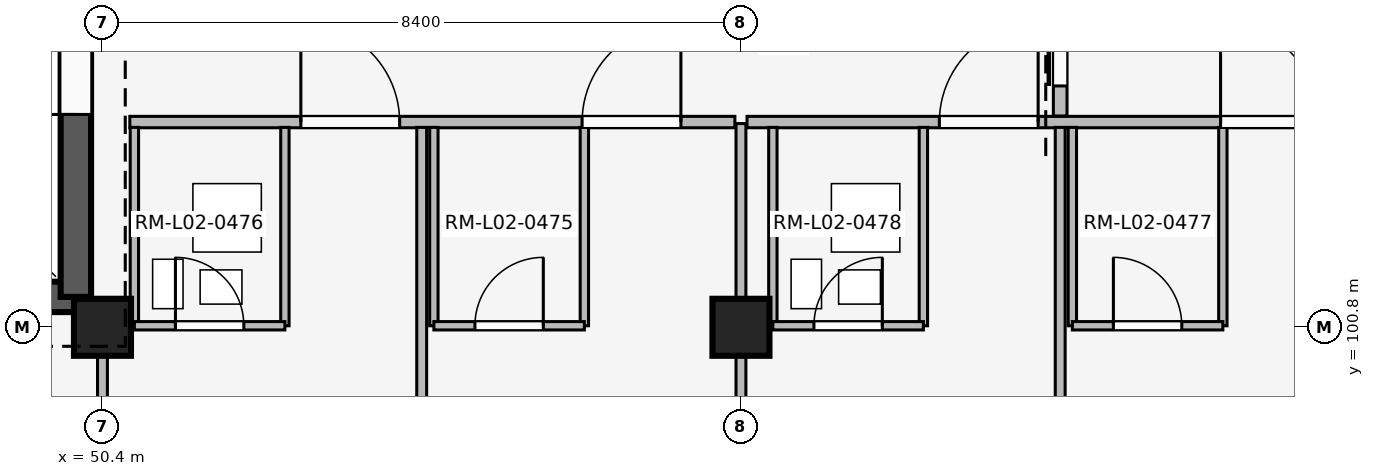
"""IFC4 building model, lengths in metres.
Left out: names, types, materials, properties, quantities, classifications, styles, units other than length and angle.
Written with IfcOpenShell. Run it as: python <this file> out.ifc"""

import sys

from ifc_helpers import new_model, si_unit, direction, frame, frame_2d, origin, origin_2d, place, context, subcontext, project, spatial, rectangle, extrude, element, fill, save


model = new_model("IFC4")
c1 = context("Model", 3, precision=1e-05, world=origin(), true_north=direction((0.0, 1.0)))
c2 = subcontext(c1, "Body", "Model", "MODEL_VIEW")
j1 = project(units=[si_unit("LENGTHUNIT", "METRE"), si_unit("PLANEANGLEUNIT", "RADIAN")], contexts=[c1])
p1 = place(None, origin())
s1 = spatial("IfcSite", under=j1, at=p1, CompositionType="ELEMENT")
p2 = place(p1, origin())
s2 = spatial("IfcBuilding", under=s1, at=p2, CompositionType="ELEMENT")
p3 = place(p2, frame((0.0, 0.0, 8.1)))
s3 = spatial("IfcBuildingStorey", under=s2, at=p3, CompositionType="ELEMENT", Elevation=8.1)
for number, where, z_axis, x_axis in (
    (1, (50.4, 100.8, 0.0), (0.0, 0.0, 1.0), (1.0, 0.0, 0.0)),
    (2, (58.8, 100.8, 0.0), (0.0, 0.0, 1.0), (1.0, 0.0, 0.0)),
):
    element("IfcColumn", number, at=place(p3, frame(where, z_axis=z_axis, x_axis=x_axis)), inside=s3, PredefinedType="COLUMN", context=c2, shape_type="SweptSolid", body=[
        extrude(rectangle(XDim=0.75, YDim=0.75, at=origin_2d()), origin(), (0.0, 0.0, 1.0), 4.8),
    ])
p4 = place(p3, frame((42.55, 101.2, 0.0), z_axis=(0.0, 0.0, 1.0), x_axis=(1.0, 0.0, 0.0)))
e3 = element("IfcWall", 3, at=p4, inside=s3, PredefinedType="SHEAR", context=c2, shape_type="SweptSolid", body=[
    extrude(rectangle(XDim=7.5, YDim=0.4, at=frame_2d((3.75, 0.0))), origin(), (0.0, 0.0, 1.0), 4.52),
])
p5 = place(p4, frame((4.85, 0.0, 0.0)))
e4 = element("IfcOpeningElement", 4, at=p5, cuts=e3, PredefinedType="OPENING", context=c2, shape_type="SweptSolid", body=[
    extrude(rectangle(XDim=1.2, YDim=2.2, at=frame_2d((0.6, 1.1))), frame((0.0, 0.21, 0.0), z_axis=(0.0, -1.0, 0.0), x_axis=(1.0, 0.0, 0.0)), (0.0, 0.0, 1.0), 0.42),
])
p6 = place(p3, frame((50.05, 101.2, 0.0), z_axis=(0.0, 0.0, 1.0), x_axis=(0.0, 1.0, 0.0)))
e5 = element("IfcWall", 5, at=p6, inside=s3, PredefinedType="SHEAR", context=c2, shape_type="SweptSolid", body=[
    extrude(rectangle(XDim=7.55, YDim=0.4, at=frame_2d((3.775, 0.0))), origin(), (0.0, 0.0, 1.0), 4.52),
])
p7 = place(p6, frame((2.4, 0.0, 0.0)))
e6 = element("IfcOpeningElement", 6, at=p7, cuts=e5, PredefinedType="OPENING", context=c2, shape_type="SweptSolid", body=[
    extrude(rectangle(XDim=1.2, YDim=2.2, at=frame_2d((0.6, 1.1))), frame((0.0, 0.21, 0.0), z_axis=(0.0, -1.0, 0.0), x_axis=(1.0, 0.0, 0.0)), (0.0, 0.0, 1.0), 0.42),
])
p8 = place(p3, frame((50.4, 92.54, 0.0), z_axis=(0.0, 0.0, 1.0), x_axis=(0.0, 1.0, 0.0)))
e7 = element("IfcWall", 7, at=p8, inside=s3, PredefinedType="PARTITIONING", context=c2, shape_type="SweptSolid", body=[
    extrude(rectangle(XDim=8.21, YDim=0.13, at=frame_2d((4.105, 0.0))), origin(), (0.0, 0.0, 1.0), 3.84),
])
p9 = place(p8, frame((3.64, 0.0, 0.0)))
e8 = element("IfcOpeningElement", 8, at=p9, cuts=e7, PredefinedType="OPENING", context=c2, shape_type="SweptSolid", body=[
    extrude(rectangle(XDim=1.08, YDim=2.15, at=frame_2d((0.54, 1.075))), frame((0.0, 0.075, 0.0), z_axis=(0.0, -1.0, 0.0), x_axis=(1.0, 0.0, 0.0)), (0.0, 0.0, 1.0), 0.15),
])
p10 = place(p3, frame((50.76, 103.5, 0.0), z_axis=(0.0, 0.0, 1.0), x_axis=(1.0, 0.0, 0.0)))
e9 = element("IfcWall", 9, at=p10, inside=s3, PredefinedType="PARTITIONING", context=c2, shape_type="SweptSolid", body=[
    extrude(rectangle(XDim=7.96, YDim=0.15, at=frame_2d((3.98, 0.0))), origin(), (0.0, 0.0, 1.0), 3.84),
])
p11 = place(p10, frame((2.25, 0.0, 0.0)))
e10 = element("IfcOpeningElement", 10, at=p11, cuts=e9, PredefinedType="OPENING", context=c2, shape_type="SweptSolid", body=[
    extrude(rectangle(XDim=1.3, YDim=2.25, at=frame_2d((0.65, 1.125))), frame((0.0, 0.085, 0.0), z_axis=(0.0, -1.0, 0.0), x_axis=(1.0, 0.0, 0.0)), (0.0, 0.0, 1.0), 0.17),
])
p12 = place(p10, frame((5.95, 0.0, 0.0)))
e11 = element("IfcOpeningElement", 11, at=p12, cuts=e9, PredefinedType="OPENING", context=c2, shape_type="SweptSolid", body=[
    extrude(rectangle(XDim=1.3, YDim=2.25, at=frame_2d((0.65, 1.125))), frame((0.0, 0.085, 0.0), z_axis=(0.0, -1.0, 0.0), x_axis=(1.0, 0.0, 0.0)), (0.0, 0.0, 1.0), 0.17),
])
p13 = place(p3, frame((54.6, 92.5, 0.0), z_axis=(0.0, 0.0, 1.0), x_axis=(0.0, 1.0, 0.0)))
e12 = element("IfcWall", 12, at=p13, inside=s3, PredefinedType="PARTITIONING", context=c2, shape_type="SweptSolid", body=[
    extrude(rectangle(XDim=10.93, YDim=0.13, at=frame_2d((5.465, 0.0))), origin(), (0.0, 0.0, 1.0), 3.84),
])
for number, where, z_axis, x_axis in (
    (13, (50.82, 100.82, 0.0), (0.0, 0.0, 1.0), (0.0, 1.0, 0.0)),
    (14, (52.8, 100.82, 0.0), (0.0, 0.0, 1.0), (0.0, 1.0, 0.0)),
):
    element("IfcWall", number, at=place(p3, frame(where, z_axis=z_axis, x_axis=x_axis)), inside=s3, PredefinedType="PARTITIONING", context=c2, shape_type="SweptSolid", body=[
        extrude(rectangle(XDim=2.61, YDim=0.11, at=frame_2d((1.305, 0.0))), origin(), (0.0, 0.0, 1.0), 3.84),
    ])
p14 = place(p3, frame((50.82, 100.82, 0.0), z_axis=(0.0, 0.0, 1.0), x_axis=(1.0, 0.0, 0.0)))
e15 = element("IfcWall", 15, at=p14, inside=s3, PredefinedType="PARTITIONING", context=c2, shape_type="SweptSolid", body=[
    extrude(rectangle(XDim=1.98, YDim=0.11, at=frame_2d((0.99, 0.0))), origin(), (0.0, 0.0, 1.0), 3.84),
])
p15 = place(p14, frame((0.54, 0.0, 0.0)))
e16 = element("IfcOpeningElement", 16, at=p15, cuts=e15, PredefinedType="OPENING", context=c2, shape_type="SweptSolid", body=[
    extrude(rectangle(XDim=0.9, YDim=2.1, at=frame_2d((0.45, 1.05))), frame((0.0, 0.065, 0.0), z_axis=(0.0, -1.0, 0.0), x_axis=(1.0, 0.0, 0.0)), (0.0, 0.0, 1.0), 0.13),
])
for number, where, z_axis, x_axis in (
    (17, (54.76, 100.82, 0.0), (0.0, 0.0, 1.0), (0.0, 1.0, 0.0)),
    (18, (56.74, 100.82, 0.0), (0.0, 0.0, 1.0), (0.0, 1.0, 0.0)),
):
    element("IfcWall", number, at=place(p3, frame(where, z_axis=z_axis, x_axis=x_axis)), inside=s3, PredefinedType="PARTITIONING", context=c2, shape_type="SweptSolid", body=[
        extrude(rectangle(XDim=2.61, YDim=0.11, at=frame_2d((1.305, 0.0))), origin(), (0.0, 0.0, 1.0), 3.84),
    ])
p16 = place(p3, frame((54.76, 100.82, 0.0), z_axis=(0.0, 0.0, 1.0), x_axis=(1.0, 0.0, 0.0)))
e19 = element("IfcWall", 19, at=p16, inside=s3, PredefinedType="PARTITIONING", context=c2, shape_type="SweptSolid", body=[
    extrude(rectangle(XDim=1.98, YDim=0.11, at=frame_2d((0.99, 0.0))), origin(), (0.0, 0.0, 1.0), 3.84),
])
p17 = place(p16, frame((0.54, 0.0, 0.0)))
e20 = element("IfcOpeningElement", 20, at=p17, cuts=e19, PredefinedType="OPENING", context=c2, shape_type="SweptSolid", body=[
    extrude(rectangle(XDim=0.9, YDim=2.1, at=frame_2d((0.45, 1.05))), frame((0.0, 0.065, 0.0), z_axis=(0.0, -1.0, 0.0), x_axis=(1.0, 0.0, 0.0)), (0.0, 0.0, 1.0), 0.13),
])
p18 = place(p3, frame((58.8, 92.54, 0.0), z_axis=(0.0, 0.0, 1.0), x_axis=(0.0, 1.0, 0.0)))
e21 = element("IfcWall", 21, at=p18, inside=s3, PredefinedType="PARTITIONING", context=c2, shape_type="SweptSolid", body=[
    extrude(rectangle(XDim=10.94, YDim=0.13, at=frame_2d((5.47, 0.0))), origin(), (0.0, 0.0, 1.0), 3.84),
])
p19 = place(p3, frame((58.88, 103.5, 0.0), z_axis=(0.0, 0.0, 1.0), x_axis=(1.0, 0.0, 0.0)))
e22 = element("IfcWall", 22, at=p19, inside=s3, PredefinedType="PARTITIONING", context=c2, shape_type="SweptSolid", body=[
    extrude(rectangle(XDim=8.24, YDim=0.15, at=frame_2d((4.12, 0.0))), origin(), (0.0, 0.0, 1.0), 3.84),
])
p20 = place(p19, frame((2.53, 0.0, 0.0)))
e23 = element("IfcOpeningElement", 23, at=p20, cuts=e22, PredefinedType="OPENING", context=c2, shape_type="SweptSolid", body=[
    extrude(rectangle(XDim=1.3, YDim=2.25, at=frame_2d((0.65, 1.125))), frame((0.0, 0.085, 0.0), z_axis=(0.0, -1.0, 0.0), x_axis=(1.0, 0.0, 0.0)), (0.0, 0.0, 1.0), 0.17),
])
p21 = place(p19, frame((6.23, 0.0, 0.0)))
e24 = element("IfcOpeningElement", 24, at=p21, cuts=e22, PredefinedType="OPENING", context=c2, shape_type="SweptSolid", body=[
    extrude(rectangle(XDim=1.3, YDim=2.25, at=frame_2d((0.65, 1.125))), frame((0.0, 0.085, 0.0), z_axis=(0.0, -1.0, 0.0), x_axis=(1.0, 0.0, 0.0)), (0.0, 0.0, 1.0), 0.17),
])
p22 = place(p3, frame((63.0, 92.5, 0.0), z_axis=(0.0, 0.0, 1.0), x_axis=(0.0, 1.0, 0.0)))
e25 = element("IfcWall", 25, at=p22, inside=s3, PredefinedType="PARTITIONING", context=c2, shape_type="SweptSolid", body=[
    extrude(rectangle(XDim=10.93, YDim=0.13, at=frame_2d((5.465, 0.0))), origin(), (0.0, 0.0, 1.0), 3.84),
])
for number, where, z_axis, x_axis in (
    (26, (59.22, 100.82, 0.0), (0.0, 0.0, 1.0), (0.0, 1.0, 0.0)),
    (27, (61.2, 100.82, 0.0), (0.0, 0.0, 1.0), (0.0, 1.0, 0.0)),
):
    element("IfcWall", number, at=place(p3, frame(where, z_axis=z_axis, x_axis=x_axis)), inside=s3, PredefinedType="PARTITIONING", context=c2, shape_type="SweptSolid", body=[
        extrude(rectangle(XDim=2.61, YDim=0.11, at=frame_2d((1.305, 0.0))), origin(), (0.0, 0.0, 1.0), 3.84),
    ])
p23 = place(p3, frame((59.22, 100.82, 0.0), z_axis=(0.0, 0.0, 1.0), x_axis=(1.0, 0.0, 0.0)))
e28 = element("IfcWall", 28, at=p23, inside=s3, PredefinedType="PARTITIONING", context=c2, shape_type="SweptSolid", body=[
    extrude(rectangle(XDim=1.98, YDim=0.11, at=frame_2d((0.99, 0.0))), origin(), (0.0, 0.0, 1.0), 3.84),
])
p24 = place(p23, frame((0.54, 0.0, 0.0)))
e29 = element("IfcOpeningElement", 29, at=p24, cuts=e28, PredefinedType="OPENING", context=c2, shape_type="SweptSolid", body=[
    extrude(rectangle(XDim=0.9, YDim=2.1, at=frame_2d((0.45, 1.05))), frame((0.0, 0.065, 0.0), z_axis=(0.0, -1.0, 0.0), x_axis=(1.0, 0.0, 0.0)), (0.0, 0.0, 1.0), 0.13),
])
for number, where, z_axis, x_axis in (
    (30, (63.16, 100.82, 0.0), (0.0, 0.0, 1.0), (0.0, 1.0, 0.0)),
    (31, (65.14, 100.82, 0.0), (0.0, 0.0, 1.0), (0.0, 1.0, 0.0)),
):
    element("IfcWall", number, at=place(p3, frame(where, z_axis=z_axis, x_axis=x_axis)), inside=s3, PredefinedType="PARTITIONING", context=c2, shape_type="SweptSolid", body=[
        extrude(rectangle(XDim=2.61, YDim=0.11, at=frame_2d((1.305, 0.0))), origin(), (0.0, 0.0, 1.0), 3.84),
    ])
p25 = place(p3, frame((63.16, 100.82, 0.0), z_axis=(0.0, 0.0, 1.0), x_axis=(1.0, 0.0, 0.0)))
e32 = element("IfcWall", 32, at=p25, inside=s3, PredefinedType="PARTITIONING", context=c2, shape_type="SweptSolid", body=[
    extrude(rectangle(XDim=1.98, YDim=0.11, at=frame_2d((0.99, 0.0))), origin(), (0.0, 0.0, 1.0), 3.84),
])
p26 = place(p25, frame((0.54, 0.0, 0.0)))
e33 = element("IfcOpeningElement", 33, at=p26, cuts=e32, PredefinedType="OPENING", context=c2, shape_type="SweptSolid", body=[
    extrude(rectangle(XDim=0.9, YDim=2.1, at=frame_2d((0.45, 1.05))), frame((0.0, 0.065, 0.0), z_axis=(0.0, -1.0, 0.0), x_axis=(1.0, 0.0, 0.0)), (0.0, 0.0, 1.0), 0.13),
])
p27 = place(p3, frame((63.0, 103.58, 0.0), z_axis=(0.0, 0.0, 1.0), x_axis=(0.0, 1.0, 0.0)))
e34 = element("IfcWall", 34, at=p27, inside=s3, PredefinedType="PARTITIONING", context=c2, shape_type="SweptSolid", body=[
    extrude(rectangle(XDim=2.84, YDim=0.18, at=frame_2d((1.42, 0.0))), origin(), (0.0, 0.0, 1.0), 3.84),
])
p28 = place(p27, frame((0.395, 0.0, 0.0)))
e35 = element("IfcOpeningElement", 35, at=p28, cuts=e34, PredefinedType="OPENING", context=c2, shape_type="SweptSolid", body=[
    extrude(rectangle(XDim=2.05, YDim=2.35, at=frame_2d((1.025, 1.175))), frame((0.0, 0.1, 0.0), z_axis=(0.0, -1.0, 0.0), x_axis=(1.0, 0.0, 0.0)), (0.0, 0.0, 1.0), 0.2),
])
p29 = place(p7, origin())
e36 = element("IfcDoor", 36, at=p29, inside=s3, OperationType="SINGLE_SWING_LEFT", PredefinedType="DOOR", context=c2, shape_type="SweptSolid", body=[
    extrude(rectangle(XDim=1.2, YDim=2.2, at=frame_2d((0.6, 1.1))), frame((0.0, 0.025, 0.0), z_axis=(0.0, -1.0, 0.0), x_axis=(1.0, 0.0, 0.0)), (0.0, 0.0, 1.0), 0.05),
])
fill(e6, e36)
p30 = place(p11, origin())
e37 = element("IfcDoor", 37, at=p30, inside=s3, OperationType="SINGLE_SWING_LEFT", PredefinedType="DOOR", context=c2, shape_type="SweptSolid", body=[
    extrude(rectangle(XDim=1.3, YDim=2.25, at=frame_2d((0.65, 1.125))), frame((0.0, 0.025, 0.0), z_axis=(0.0, -1.0, 0.0), x_axis=(1.0, 0.0, 0.0)), (0.0, 0.0, 1.0), 0.05),
])
fill(e10, e37)
p31 = place(p12, origin())
e38 = element("IfcDoor", 38, at=p31, inside=s3, OperationType="SINGLE_SWING_RIGHT", PredefinedType="DOOR", context=c2, shape_type="SweptSolid", body=[
    extrude(rectangle(XDim=1.3, YDim=2.25, at=frame_2d((0.65, 1.125))), frame((0.0, 0.025, 0.0), z_axis=(0.0, -1.0, 0.0), x_axis=(1.0, 0.0, 0.0)), (0.0, 0.0, 1.0), 0.05),
])
fill(e11, e38)
p32 = place(p15, origin())
e39 = element("IfcDoor", 39, at=p32, inside=s3, OperationType="SINGLE_SWING_LEFT", PredefinedType="DOOR", context=c2, shape_type="SweptSolid", body=[
    extrude(rectangle(XDim=0.9, YDim=2.1, at=frame_2d((0.45, 1.05))), frame((0.0, 0.025, 0.0), z_axis=(0.0, -1.0, 0.0), x_axis=(1.0, 0.0, 0.0)), (0.0, 0.0, 1.0), 0.05),
])
fill(e16, e39)
p33 = place(p17, origin())
e40 = element("IfcDoor", 40, at=p33, inside=s3, OperationType="SINGLE_SWING_RIGHT", PredefinedType="DOOR", context=c2, shape_type="SweptSolid", body=[
    extrude(rectangle(XDim=0.9, YDim=2.1, at=frame_2d((0.45, 1.05))), frame((0.0, 0.025, 0.0), z_axis=(0.0, -1.0, 0.0), x_axis=(1.0, 0.0, 0.0)), (0.0, 0.0, 1.0), 0.05),
])
fill(e20, e40)
p34 = place(p20, origin())
e41 = element("IfcDoor", 41, at=p34, inside=s3, OperationType="SINGLE_SWING_RIGHT", PredefinedType="DOOR", context=c2, shape_type="SweptSolid", body=[
    extrude(rectangle(XDim=1.3, YDim=2.25, at=frame_2d((0.65, 1.125))), frame((0.0, 0.025, 0.0), z_axis=(0.0, -1.0, 0.0), x_axis=(1.0, 0.0, 0.0)), (0.0, 0.0, 1.0), 0.05),
])
fill(e23, e41)
p35 = place(p21, origin())
e42 = element("IfcDoor", 42, at=p35, inside=s3, OperationType="SINGLE_SWING_LEFT", PredefinedType="DOOR", context=c2, shape_type="SweptSolid", body=[
    extrude(rectangle(XDim=1.3, YDim=2.25, at=frame_2d((0.65, 1.125))), frame((0.0, 0.025, 0.0), z_axis=(0.0, -1.0, 0.0), x_axis=(1.0, 0.0, 0.0)), (0.0, 0.0, 1.0), 0.05),
])
fill(e24, e42)
p36 = place(p24, origin())
e43 = element("IfcDoor", 43, at=p36, inside=s3, OperationType="SINGLE_SWING_RIGHT", PredefinedType="DOOR", context=c2, shape_type="SweptSolid", body=[
    extrude(rectangle(XDim=0.9, YDim=2.1, at=frame_2d((0.45, 1.05))), frame((0.0, 0.025, 0.0), z_axis=(0.0, -1.0, 0.0), x_axis=(1.0, 0.0, 0.0)), (0.0, 0.0, 1.0), 0.05),
])
fill(e29, e43)
p37 = place(p26, origin())
e44 = element("IfcDoor", 44, at=p37, inside=s3, OperationType="SINGLE_SWING_LEFT", PredefinedType="DOOR", context=c2, shape_type="SweptSolid", body=[
    extrude(rectangle(XDim=0.9, YDim=2.1, at=frame_2d((0.45, 1.05))), frame((0.0, 0.025, 0.0), z_axis=(0.0, -1.0, 0.0), x_axis=(1.0, 0.0, 0.0)), (0.0, 0.0, 1.0), 0.05),
])
fill(e33, e44)
p38 = place(p28, origin())
e45 = element("IfcDoor", 45, at=p38, inside=s3, OperationType="SLIDING_TO_LEFT", PredefinedType="DOOR", context=c2, shape_type="SweptSolid", body=[
    extrude(rectangle(XDim=2.05, YDim=2.35, at=frame_2d((1.025, 1.175))), frame((0.0, 0.025, 0.0), z_axis=(0.0, -1.0, 0.0), x_axis=(1.0, 0.0, 0.0)), (0.0, 0.0, 1.0), 0.05),
])
fill(e35, e45)
save(model, sys.argv[1])
